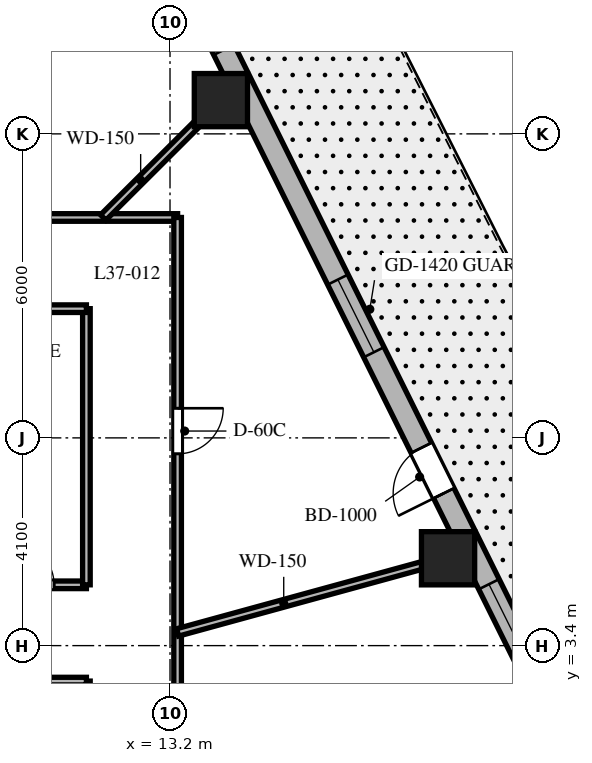
"""IFC4 building model, lengths in metres.
Left out: names, types, materials, properties, quantities, classifications, styles, units other than length and angle.
Written with IfcOpenShell. Run it as: python <this file> out.ifc"""

import sys

from ifc_helpers import new_model, si_unit, direction, frame, frame_2d, origin, origin_2d, place, context, subcontext, project, spatial, rectangle, extrude, element, fill, save


model = new_model("IFC4")
c1 = context("Model", 3, precision=1e-05, world=origin(), true_north=direction((0.0, 1.0)))
c2 = subcontext(c1, "Body", "Model", "MODEL_VIEW")
j1 = project(units=[si_unit("LENGTHUNIT", "METRE"), si_unit("PLANEANGLEUNIT", "RADIAN")], contexts=[c1])
p1 = place(None, origin())
s1 = spatial("IfcSite", under=j1, at=p1, CompositionType="ELEMENT")
p2 = place(p1, origin())
s2 = spatial("IfcBuilding", under=s1, at=p2, CompositionType="ELEMENT")
p3 = place(p2, frame((0.0, 0.0, 151.7)))
s3 = spatial("IfcBuildingStorey", under=s2, at=p3, CompositionType="ELEMENT", Elevation=151.7)
for number, where, z_axis, x_axis in (
    (1, (18.687, 5.124, 0.0), (0.0, 0.0, 1.0), (1.0, 0.0, 0.0)),
    (2, (14.204, 14.166, 0.0), (0.0, 0.0, 1.0), (1.0, 0.0, 0.0)),
):
    element("IfcColumn", number, at=place(p3, frame(where, z_axis=z_axis, x_axis=x_axis)), inside=s3, PredefinedType="COLUMN", context=c2, shape_type="SweptSolid", body=[
        extrude(rectangle(XDim=1.05, YDim=1.05, at=origin_2d()), origin(), (0.0, 0.0, 1.0), 3.7),
    ])
p4 = place(p3, frame((20.618, 2.344, 0.0), z_axis=(0.0, 0.0, 1.0), x_axis=(-0.444243691097, 0.895905990002, 0.0)))
e3 = element("IfcWall", 3, at=p4, inside=s3, PredefinedType="SOLIDWALL", context=c2, shape_type="SweptSolid", body=[
    extrude(rectangle(XDim=16.784, YDim=0.45, at=frame_2d((8.392, 0.0))), origin(), (0.0, 0.0, 1.0), 3.4),
])
p5 = place(p4, frame((4.535, 0.0, 0.0)))
e4 = element("IfcOpeningElement", 4, at=p5, cuts=e3, PredefinedType="OPENING", context=c2, shape_type="SweptSolid", body=[
    extrude(rectangle(XDim=1.0, YDim=2.15, at=frame_2d((0.5, 1.075))), frame((0.0, 0.235, 0.0), z_axis=(0.0, -1.0, 0.0), x_axis=(1.0, 0.0, 0.0)), (0.0, 0.0, 1.0), 0.47),
])
p6 = place(p4, frame((7.642, 0.0, 0.8)))
e5 = element("IfcOpeningElement", 5, at=p6, cuts=e3, PredefinedType="OPENING", context=c2, shape_type="SweptSolid", body=[
    extrude(rectangle(XDim=1.6, YDim=1.75, at=frame_2d((0.8, 0.875))), frame((0.0, 0.235, 0.0), z_axis=(0.0, -1.0, 0.0), x_axis=(1.0, 0.0, 0.0)), (0.0, 0.0, 1.0), 0.47),
])
p7 = place(p4, frame((14.303, 0.0, 0.8)))
e6 = element("IfcOpeningElement", 6, at=p7, cuts=e3, PredefinedType="OPENING", context=c2, shape_type="SweptSolid", body=[
    extrude(rectangle(XDim=1.6, YDim=1.75, at=frame_2d((0.8, 0.875))), frame((0.0, 0.235, 0.0), z_axis=(0.0, -1.0, 0.0), x_axis=(1.0, 0.0, 0.0)), (0.0, 0.0, 1.0), 0.47),
])
p8 = place(p4, frame((0.931, 0.0, 0.8)))
e7 = element("IfcOpeningElement", 7, at=p8, cuts=e3, PredefinedType="OPENING", context=c2, shape_type="SweptSolid", body=[
    extrude(rectangle(XDim=1.6, YDim=1.75, at=frame_2d((0.8, 0.875))), frame((0.0, 0.235, 0.0), z_axis=(0.0, -1.0, 0.0), x_axis=(1.0, 0.0, 0.0)), (0.0, 0.0, 1.0), 0.47),
])
p9 = place(p3, frame((-13.35, 11.85, 0.0), z_axis=(0.0, 0.0, 1.0), x_axis=(1.0, 0.0, 0.0)))
e8 = element("IfcWall", 8, at=p9, inside=s3, PredefinedType="PARTITIONING", context=c2, shape_type="SweptSolid", body=[
    extrude(rectangle(XDim=26.7, YDim=0.15, at=frame_2d((13.35, 0.0))), origin(), (0.0, 0.0, 1.0), 2.84),
])
p10 = place(p9, frame((20.682, 0.0, 0.0)))
e9 = element("IfcOpeningElement", 9, at=p10, cuts=e8, PredefinedType="OPENING", context=c2, shape_type="SweptSolid", body=[
    extrude(rectangle(XDim=0.95, YDim=2.03, at=frame_2d((0.475, 1.015))), frame((0.0, 0.085, 0.0), z_axis=(0.0, -1.0, 0.0), x_axis=(1.0, 0.0, 0.0)), (0.0, 0.0, 1.0), 0.17),
])
p11 = place(p9, frame((14.229, 0.0, 0.0)))
e10 = element("IfcOpeningElement", 10, at=p11, cuts=e8, PredefinedType="OPENING", context=c2, shape_type="SweptSolid", body=[
    extrude(rectangle(XDim=0.95, YDim=2.03, at=frame_2d((0.475, 1.015))), frame((0.0, 0.085, 0.0), z_axis=(0.0, -1.0, 0.0), x_axis=(1.0, 0.0, 0.0)), (0.0, 0.0, 1.0), 0.17),
])
p12 = place(p9, frame((10.075, 0.0, 0.0)))
e11 = element("IfcOpeningElement", 11, at=p12, cuts=e8, PredefinedType="OPENING", context=c2, shape_type="SweptSolid", body=[
    extrude(rectangle(XDim=0.95, YDim=2.03, at=frame_2d((0.475, 1.015))), frame((0.0, 0.085, 0.0), z_axis=(0.0, -1.0, 0.0), x_axis=(1.0, 0.0, 0.0)), (0.0, 0.0, 1.0), 0.17),
])
p13 = place(p9, frame((3.995, 0.0, 0.0)))
e12 = element("IfcOpeningElement", 12, at=p13, cuts=e8, PredefinedType="OPENING", context=c2, shape_type="SweptSolid", body=[
    extrude(rectangle(XDim=0.95, YDim=2.03, at=frame_2d((0.475, 1.015))), frame((0.0, 0.085, 0.0), z_axis=(0.0, -1.0, 0.0), x_axis=(1.0, 0.0, 0.0)), (0.0, 0.0, 1.0), 0.17),
])
p14 = place(p3, frame((13.35, 11.85, 0.0), z_axis=(0.0, 0.0, 1.0), x_axis=(0.0, -1.0, 0.0)))
e13 = element("IfcWall", 13, at=p14, inside=s3, PredefinedType="PARTITIONING", context=c2, shape_type="SweptSolid", body=[
    extrude(rectangle(XDim=23.7, YDim=0.15, at=frame_2d((11.85, 0.0))), origin(), (0.0, 0.0, 1.0), 2.84),
])
p15 = place(p14, frame((3.765, 0.0, 0.0)))
e14 = element("IfcOpeningElement", 14, at=p15, cuts=e13, PredefinedType="OPENING", context=c2, shape_type="SweptSolid", body=[
    extrude(rectangle(XDim=0.9, YDim=2.03, at=frame_2d((0.45, 1.015))), frame((0.0, 0.085, 0.0), z_axis=(0.0, -1.0, 0.0), x_axis=(1.0, 0.0, 0.0)), (0.0, 0.0, 1.0), 0.17),
])
p16 = place(p14, frame((20.395, 0.0, 0.0)))
e15 = element("IfcOpeningElement", 15, at=p16, cuts=e13, PredefinedType="OPENING", context=c2, shape_type="SweptSolid", body=[
    extrude(rectangle(XDim=0.9, YDim=2.03, at=frame_2d((0.45, 1.015))), frame((0.0, 0.085, 0.0), z_axis=(0.0, -1.0, 0.0), x_axis=(1.0, 0.0, 0.0)), (0.0, 0.0, 1.0), 0.17),
])
p17 = place(p14, frame((15.787, 0.0, 0.0)))
e16 = element("IfcOpeningElement", 16, at=p17, cuts=e13, PredefinedType="OPENING", context=c2, shape_type="SweptSolid", body=[
    extrude(rectangle(XDim=0.95, YDim=2.03, at=frame_2d((0.475, 1.015))), frame((0.0, 0.085, 0.0), z_axis=(0.0, -1.0, 0.0), x_axis=(1.0, 0.0, 0.0)), (0.0, 0.0, 1.0), 0.17),
])
p18 = place(p14, frame((10.751, 0.0, 0.0)))
e17 = element("IfcOpeningElement", 17, at=p18, cuts=e13, PredefinedType="OPENING", context=c2, shape_type="SweptSolid", body=[
    extrude(rectangle(XDim=0.95, YDim=2.03, at=frame_2d((0.475, 1.015))), frame((0.0, 0.085, 0.0), z_axis=(0.0, -1.0, 0.0), x_axis=(1.0, 0.0, 0.0)), (0.0, 0.0, 1.0), 0.17),
])
p19 = place(p3, frame((11.55, -10.05, 0.0), z_axis=(0.0, 0.0, 1.0), x_axis=(0.0, 1.0, 0.0)))
e18 = element("IfcWall", 18, at=p19, inside=s3, PredefinedType="PARTITIONING", context=c2, shape_type="SweptSolid", body=[
    extrude(rectangle(XDim=12.75, YDim=0.15, at=frame_2d((6.375, 0.0))), origin(), (0.0, 0.0, 1.0), 2.84),
])
p20 = place(p19, frame((5.95, 0.0, 0.0)))
e19 = element("IfcOpeningElement", 19, at=p20, cuts=e18, PredefinedType="OPENING", context=c2, shape_type="SweptSolid", body=[
    extrude(rectangle(XDim=0.85, YDim=2.03, at=frame_2d((0.425, 1.015))), frame((0.0, 0.085, 0.0), z_axis=(0.0, -1.0, 0.0), x_axis=(1.0, 0.0, 0.0)), (0.0, 0.0, 1.0), 0.17),
])
p21 = place(p3, frame((11.55, 2.7, 0.0), z_axis=(0.0, 0.0, 1.0), x_axis=(-1.0, 0.0, 0.0)))
e20 = element("IfcWall", 20, at=p21, inside=s3, PredefinedType="PARTITIONING", context=c2, shape_type="SweptSolid", body=[
    extrude(rectangle(XDim=2.125, YDim=0.15, at=frame_2d((1.062, 0.0))), origin(), (0.0, 0.0, 1.0), 3.4),
])
p22 = place(p3, frame((9.425, 4.6, 0.0), z_axis=(0.0, 0.0, 1.0), x_axis=(1.0, 0.0, 0.0)))
e21 = element("IfcWall", 21, at=p22, inside=s3, PredefinedType="PARTITIONING", context=c2, shape_type="SweptSolid", body=[
    extrude(rectangle(XDim=2.125, YDim=0.15, at=frame_2d((1.062, 0.0))), origin(), (0.0, 0.0, 1.0), 3.4),
])
p23 = place(p22, frame((0.637, 0.0, 0.0)))
e22 = element("IfcOpeningElement", 22, at=p23, cuts=e21, PredefinedType="OPENING", context=c2, shape_type="SweptSolid", body=[
    extrude(rectangle(XDim=0.85, YDim=2.03, at=frame_2d((0.425, 1.015))), frame((0.0, 0.085, 0.0), z_axis=(0.0, -1.0, 0.0), x_axis=(1.0, 0.0, 0.0)), (0.0, 0.0, 1.0), 0.17),
])
p24 = place(p3, frame((11.55, 4.6, 0.0), z_axis=(0.0, 0.0, 1.0), x_axis=(0.0, 1.0, 0.0)))
e23 = element("IfcWall", 23, at=p24, inside=s3, PredefinedType="PARTITIONING", context=c2, shape_type="SweptSolid", body=[
    extrude(rectangle(XDim=5.45, YDim=0.15, at=frame_2d((2.725, 0.0))), origin(), (0.0, 0.0, 1.0), 2.84),
])
p25 = place(p3, frame((11.55, 10.05, 0.0), z_axis=(0.0, 0.0, 1.0), x_axis=(-1.0, 0.0, 0.0)))
e24 = element("IfcWall", 24, at=p25, inside=s3, PredefinedType="PARTITIONING", context=c2, shape_type="SweptSolid", body=[
    extrude(rectangle(XDim=9.65, YDim=0.15, at=frame_2d((4.825, 0.0))), origin(), (0.0, 0.0, 1.0), 2.84),
])
p26 = place(p3, frame((13.35, 3.661, 0.0), z_axis=(0.0, 0.0, 1.0), x_axis=(0.964397145454, 0.264458211898, 0.0)))
e25 = element("IfcWall", 25, at=p26, inside=s3, PredefinedType="PARTITIONING", context=c2, shape_type="SweptSolid", body=[
    extrude(rectangle(XDim=6.039, YDim=0.15, at=frame_2d((3.019, 0.0))), origin(), (0.0, 0.0, 1.0), 2.64),
])
p27 = place(p3, frame((11.882, 11.85, 0.0), z_axis=(0.0, 0.0, 1.0), x_axis=(0.708037373639, 0.706174962407, 0.0)))
e26 = element("IfcWall", 26, at=p27, inside=s3, PredefinedType="PARTITIONING", context=c2, shape_type="SweptSolid", body=[
    extrude(rectangle(XDim=3.802, YDim=0.15, at=frame_2d((1.901, 0.0))), origin(), (0.0, 0.0, 1.0), 2.64),
])
p28 = place(p5, origin())
e27 = element("IfcDoor", 27, at=p28, inside=s3, OperationType="SINGLE_SWING_LEFT", PredefinedType="DOOR", context=c2, shape_type="SweptSolid", body=[
    extrude(rectangle(XDim=1.0, YDim=2.15, at=frame_2d((0.5, 1.075))), frame((0.0, 0.025, 0.0), z_axis=(0.0, -1.0, 0.0), x_axis=(1.0, 0.0, 0.0)), (0.0, 0.0, 1.0), 0.05),
])
fill(e4, e27)
p29 = place(p6, origin())
e28 = element("IfcWindow", 28, at=p29, inside=s3, PartitioningType="SINGLE_PANEL", PredefinedType="WINDOW", context=c2, shape_type="SweptSolid", body=[
    extrude(rectangle(XDim=1.6, YDim=1.75, at=frame_2d((0.8, 0.875))), frame((0.0, 0.03, 0.0), z_axis=(0.0, -1.0, 0.0), x_axis=(1.0, 0.0, 0.0)), (0.0, 0.0, 1.0), 0.06),
])
fill(e5, e28)
p30 = place(p8, origin())
e29 = element("IfcWindow", 29, at=p30, inside=s3, PartitioningType="SINGLE_PANEL", PredefinedType="WINDOW", context=c2, shape_type="SweptSolid", body=[
    extrude(rectangle(XDim=1.6, YDim=1.75, at=frame_2d((0.8, 0.875))), frame((0.0, 0.03, 0.0), z_axis=(0.0, -1.0, 0.0), x_axis=(1.0, 0.0, 0.0)), (0.0, 0.0, 1.0), 0.06),
])
fill(e7, e29)
p31 = place(p23, origin())
e30 = element("IfcDoor", 30, at=p31, inside=s3, OperationType="SINGLE_SWING_LEFT", PredefinedType="DOOR", context=c2, shape_type="SweptSolid", body=[
    extrude(rectangle(XDim=0.85, YDim=2.03, at=frame_2d((0.425, 1.015))), frame((0.0, 0.025, 0.0), z_axis=(0.0, -1.0, 0.0), x_axis=(1.0, 0.0, 0.0)), (0.0, 0.0, 1.0), 0.05),
])
fill(e22, e30)
p32 = place(p15, origin())
e31 = element("IfcDoor", 31, at=p32, inside=s3, OperationType="SINGLE_SWING_LEFT", PredefinedType="DOOR", context=c2, shape_type="SweptSolid", body=[
    extrude(rectangle(XDim=0.9, YDim=2.03, at=frame_2d((0.45, 1.015))), frame((0.0, 0.025, 0.0), z_axis=(0.0, -1.0, 0.0), x_axis=(1.0, 0.0, 0.0)), (0.0, 0.0, 1.0), 0.05),
])
fill(e14, e31)
save(model, sys.argv[1])
